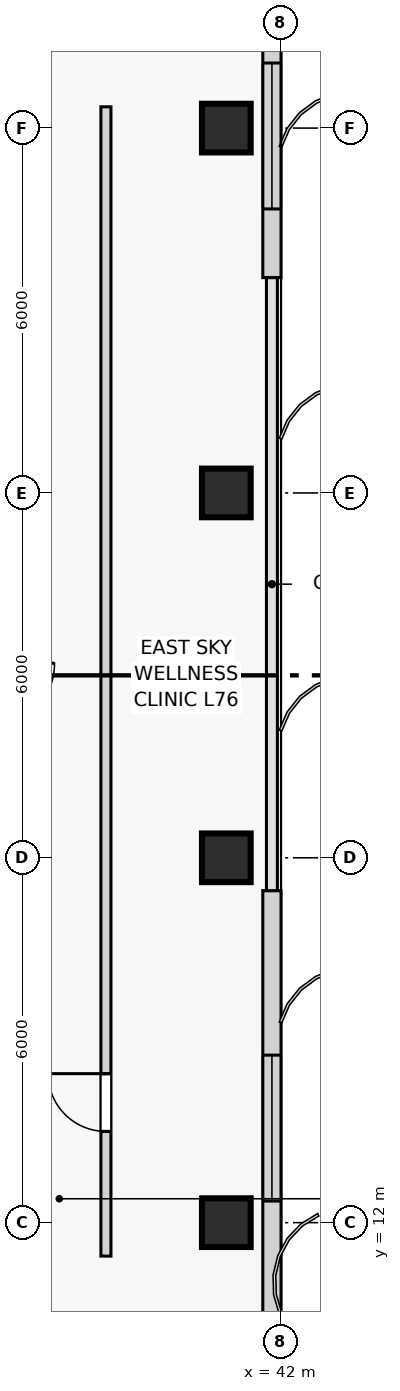
"""IFC4 building model, lengths in metres.
Left out: names, types, materials, properties, quantities, classifications, styles, units other than length and angle.
Written with IfcOpenShell. Run it as: python <this file> out.ifc"""

import sys

from ifc_helpers import new_model, si_unit, direction, frame, frame_2d, origin, origin_2d, place, context, subcontext, project, spatial, rectangle, extrude, source, transform, mapped, element, fill, save


model = new_model("IFC4")
c1 = context("Model", 3, precision=1e-05, world=origin(), true_north=direction((0.0, 1.0)))
c2 = subcontext(c1, "Body", "Model", "MODEL_VIEW")
j1 = project(units=[si_unit("LENGTHUNIT", "METRE"), si_unit("PLANEANGLEUNIT", "RADIAN")], contexts=[c1])
p1 = place(None, origin())
s1 = spatial("IfcSite", under=j1, at=p1, CompositionType="ELEMENT")
p2 = place(p1, origin())
s2 = spatial("IfcBuilding", under=s1, at=p2, CompositionType="ELEMENT")
p3 = place(p2, frame((0.0, 0.0, 289.5)))
s3 = spatial("IfcBuildingStorey", under=s2, at=p3, CompositionType="ELEMENT", Elevation=289.5)
m1 = source(origin(), c2, "Body", "SweptSolid", [
    extrude(rectangle(XDim=0.8, YDim=0.8, at=origin_2d()), origin(), (0.0, 0.0, 1.0), 4.2),
])
for number, where, z_axis, x_axis in (
    (1, (41.1, 12.0, 0.0), (0.0, 0.0, 1.0), (1.0, 0.0, 0.0)),
    (2, (41.1, 18.0, 0.0), (0.0, 0.0, 1.0), (1.0, 0.0, 0.0)),
    (3, (41.1, 24.0, 0.0), (0.0, 0.0, 1.0), (1.0, 0.0, 0.0)),
    (4, (41.1, 30.0, 0.0), (0.0, 0.0, 1.0), (1.0, 0.0, 0.0)),
):
    element("IfcColumn", number, at=place(p3, frame(where, z_axis=z_axis, x_axis=x_axis)), inside=s3, PredefinedType="COLUMN", context=c2, shape_type="MappedRepresentation", body=[
        mapped(m1, transform((0.0, 0.0, 0.0), scale=1.0)),
    ])
p4 = place(p3, frame((41.85, 6.75, 0.0), z_axis=(0.0, 0.0, 1.0), x_axis=(0.0, 1.0, 0.0)))
e5 = element("IfcWall", 5, at=p4, inside=s3, PredefinedType="SOLIDWALL", context=c2, shape_type="SweptSolid", body=[
    extrude(rectangle(XDim=10.71, YDim=0.3, at=frame_2d((5.355, 0.0))), origin(), (0.0, 0.0, 1.0), 3.92),
])
p5 = place(p4, frame((0.65, 0.0, 0.8)))
e6 = element("IfcOpeningElement", 6, at=p5, cuts=e5, PredefinedType="OPENING", context=c2, shape_type="SweptSolid", body=[
    extrude(rectangle(XDim=1.8, YDim=2.1, at=frame_2d((0.9, 1.05))), frame((0.0, 0.16, 0.0), z_axis=(0.0, -1.0, 0.0), x_axis=(1.0, 0.0, 0.0)), (0.0, 0.0, 1.0), 0.32),
])
p6 = place(p4, frame((5.605, 0.0, 0.8)))
e7 = element("IfcOpeningElement", 7, at=p6, cuts=e5, PredefinedType="OPENING", context=c2, shape_type="SweptSolid", body=[
    extrude(rectangle(XDim=2.4, YDim=2.1, at=frame_2d((1.2, 1.05))), frame((0.0, 0.16, 0.0), z_axis=(0.0, -1.0, 0.0), x_axis=(1.0, 0.0, 0.0)), (0.0, 0.0, 1.0), 0.32),
])
p7 = place(p3, frame((41.85, 27.54, 0.0), z_axis=(0.0, 0.0, 1.0), x_axis=(0.0, 1.0, 0.0)))
e8 = element("IfcWall", 8, at=p7, inside=s3, PredefinedType="SOLIDWALL", context=c2, shape_type="SweptSolid", body=[
    extrude(rectangle(XDim=10.71, YDim=0.3, at=frame_2d((5.355, 0.0))), origin(), (0.0, 0.0, 1.0), 3.92),
])
p8 = place(p7, frame((1.13, 0.0, 0.8)))
e9 = element("IfcOpeningElement", 9, at=p8, cuts=e8, PredefinedType="OPENING", context=c2, shape_type="SweptSolid", body=[
    extrude(rectangle(XDim=2.4, YDim=2.1, at=frame_2d((1.2, 1.05))), frame((0.0, 0.16, 0.0), z_axis=(0.0, -1.0, 0.0), x_axis=(1.0, 0.0, 0.0)), (0.0, 0.0, 1.0), 0.32),
])
p9 = place(p7, frame((6.385, 0.0, 0.8)))
e10 = element("IfcOpeningElement", 10, at=p9, cuts=e8, PredefinedType="OPENING", context=c2, shape_type="SweptSolid", body=[
    extrude(rectangle(XDim=2.4, YDim=2.1, at=frame_2d((1.2, 1.05))), frame((0.0, 0.16, 0.0), z_axis=(0.0, -1.0, 0.0), x_axis=(1.0, 0.0, 0.0)), (0.0, 0.0, 1.0), 0.32),
])
p10 = place(p3, frame((39.12, 11.45, 0.0), z_axis=(0.0, 0.0, 1.0), x_axis=(0.0, 1.0, 0.0)))
e11 = element("IfcWall", 11, at=p10, inside=s3, PredefinedType="PARTITIONING", context=c2, shape_type="SweptSolid", body=[
    extrude(rectangle(XDim=18.9, YDim=0.165, at=frame_2d((9.45, 0.0))), origin(), (0.0, 0.0, 1.0), 3.92),
])
p11 = place(p10, frame((2.05, 0.0, 0.0)))
e12 = element("IfcOpeningElement", 12, at=p11, cuts=e11, PredefinedType="OPENING", context=c2, shape_type="SweptSolid", body=[
    extrude(rectangle(XDim=0.95, YDim=2.1, at=frame_2d((0.475, 1.05))), frame((0.0, 0.093, 0.0), z_axis=(0.0, -1.0, 0.0), x_axis=(1.0, 0.0, 0.0)), (0.0, 0.0, 1.0), 0.185),
])
m2 = source(origin(), c2, "Body", "SweptSolid", [
    extrude(rectangle(XDim=2.4, YDim=2.1, at=frame_2d((1.2, 1.05))), frame((0.0, 0.03, 0.0), z_axis=(0.0, -1.0, 0.0), x_axis=(1.0, 0.0, 0.0)), (0.0, 0.0, 1.0), 0.06),
])
p12 = place(p6, origin())
e13 = element("IfcWindow", 13, at=p12, inside=s3, PartitioningType="SINGLE_PANEL", PredefinedType="WINDOW", context=c2, shape_type="MappedRepresentation", body=[
    mapped(m2, transform((0.0, 0.0, 0.0), scale=1.0)),
])
fill(e7, e13)
p13 = place(p8, origin())
e14 = element("IfcWindow", 14, at=p13, inside=s3, PartitioningType="SINGLE_PANEL", PredefinedType="WINDOW", context=c2, shape_type="MappedRepresentation", body=[
    mapped(m2, transform((0.0, 0.0, 0.0), scale=1.0)),
])
fill(e9, e14)
m3 = source(origin(), c2, "Body", "SweptSolid", [
    extrude(rectangle(XDim=0.95, YDim=2.1, at=frame_2d((0.475, 1.05))), frame((0.0, 0.025, 0.0), z_axis=(0.0, -1.0, 0.0), x_axis=(1.0, 0.0, 0.0)), (0.0, 0.0, 1.0), 0.05),
])
p14 = place(p11, origin())
e15 = element("IfcDoor", 15, at=p14, inside=s3, OperationType="SINGLE_SWING_RIGHT", PredefinedType="DOOR", context=c2, shape_type="MappedRepresentation", body=[
    mapped(m3, transform((0.0, 0.0, 0.0), scale=1.0)),
])
fill(e12, e15)
save(model, sys.argv[1])
